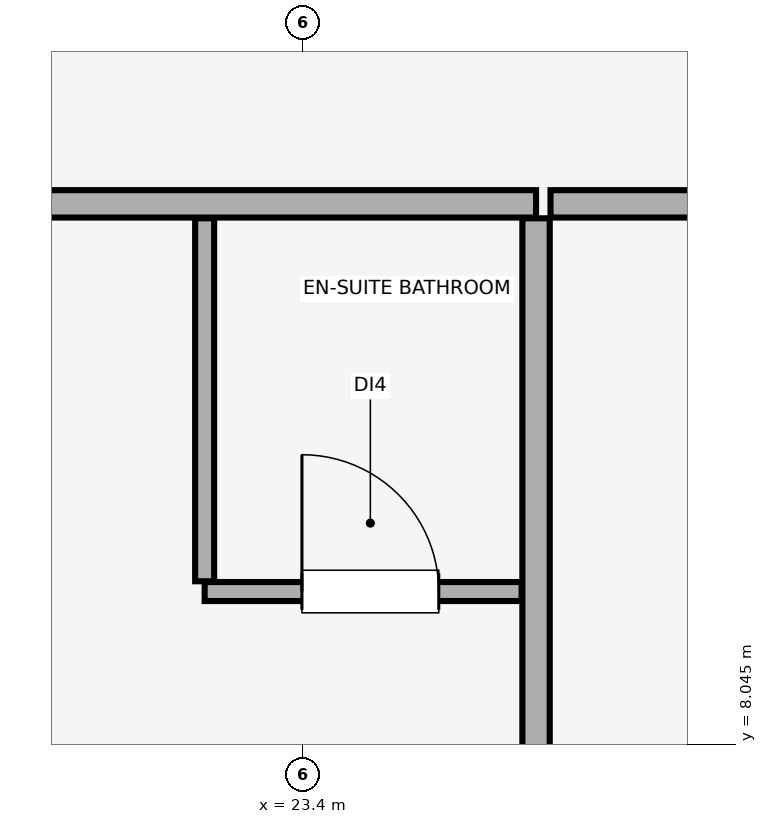
"""IFC4 building model, lengths in metres.
Left out: names, types, materials, properties, quantities, classifications, styles, units other than length and angle.
Written with IfcOpenShell. Run it as: python <this file> out.ifc"""

import sys

from ifc_helpers import new_model, si_unit, direction, frame, frame_2d, origin, place, context, subcontext, project, spatial, rectangle, extrude, element, fill, save


model = new_model("IFC4")
c1 = context("Model", 3, precision=1e-05, world=origin(), true_north=direction((0.0, 1.0)))
c2 = subcontext(c1, "Body", "Model", "MODEL_VIEW")
j1 = project(units=[si_unit("LENGTHUNIT", "METRE"), si_unit("PLANEANGLEUNIT", "RADIAN")], contexts=[c1])
p1 = place(None, origin())
s1 = spatial("IfcSite", under=j1, at=p1, CompositionType="ELEMENT")
p2 = place(p1, origin())
s2 = spatial("IfcBuilding", under=s1, at=p2, CompositionType="ELEMENT")
p3 = place(p2, frame((0.0, 0.0, 50.15)))
s3 = spatial("IfcBuildingStorey", under=s2, at=p3, CompositionType="ELEMENT", Elevation=50.15)
p4 = place(p3, frame((18.199, 11.6, 0.0), z_axis=(0.0, 0.0, 1.0), x_axis=(1.0, 0.0, 0.0)))
e1 = element("IfcWall", 1, at=p4, inside=s3, PredefinedType="PARTITIONING", context=c2, shape_type="SweptSolid", body=[
    extrude(rectangle(XDim=6.732, YDim=0.18, at=frame_2d((3.366, 0.0))), origin(), (0.0, 0.0, 1.0), 3.51),
])
p5 = place(p4, frame((1.279, 0.0, 0.0)))
e2 = element("IfcOpeningElement", 2, at=p5, cuts=e1, PredefinedType="OPENING", context=c2, shape_type="SweptSolid", body=[
    extrude(rectangle(XDim=1.0, YDim=2.15, at=frame_2d((0.5, 1.075))), frame((0.0, 0.1, 0.0), z_axis=(0.0, -1.0, 0.0), x_axis=(1.0, 0.0, 0.0)), (0.0, 0.0, 1.0), 0.2),
])
p6 = place(p3, frame((24.932, 0.15, 0.0), z_axis=(0.0, 0.0, 1.0), x_axis=(0.0, 1.0, 0.0)))
e3 = element("IfcWall", 3, at=p6, inside=s3, PredefinedType="PARTITIONING", context=c2, shape_type="SweptSolid", body=[
    extrude(rectangle(XDim=11.355, YDim=0.18, at=frame_2d((5.677, 0.0))), origin(), (0.0, 0.0, 1.0), 3.51),
])
p7 = place(p3, frame((22.752, 9.05, 0.0), z_axis=(0.0, 0.0, 1.0), x_axis=(1.0, 0.0, 0.0)))
e4 = element("IfcWall", 4, at=p7, inside=s3, PredefinedType="PARTITIONING", context=c2, shape_type="SweptSolid", body=[
    extrude(rectangle(XDim=2.085, YDim=0.125, at=frame_2d((1.042, 0.0))), origin(), (0.0, 0.0, 1.0), 3.51),
])
p8 = place(p7, frame((0.64, 0.0, 0.0)))
e5 = element("IfcOpeningElement", 5, at=p8, cuts=e4, PredefinedType="OPENING", context=c2, shape_type="SweptSolid", body=[
    extrude(rectangle(XDim=0.9, YDim=2.1, at=frame_2d((0.45, 1.05))), frame((0.0, 0.073, 0.0), z_axis=(0.0, -1.0, 0.0), x_axis=(1.0, 0.0, 0.0)), (0.0, 0.0, 1.0), 0.145),
])
p9 = place(p3, frame((22.752, 9.117, 0.0), z_axis=(0.0, 0.0, 1.0), x_axis=(0.0, 1.0, 0.0)))
e6 = element("IfcWall", 6, at=p9, inside=s3, PredefinedType="PARTITIONING", context=c2, shape_type="SweptSolid", body=[
    extrude(rectangle(XDim=2.387, YDim=0.125, at=frame_2d((1.194, 0.0))), origin(), (0.0, 0.0, 1.0), 2.88),
])
p10 = place(p3, frame((25.027, 11.6, 0.0), z_axis=(0.0, 0.0, 1.0), x_axis=(1.0, 0.0, 0.0)))
e7 = element("IfcWall", 7, at=p10, inside=s3, PredefinedType="PARTITIONING", context=c2, shape_type="SweptSolid", body=[
    extrude(rectangle(XDim=6.732, YDim=0.18, at=frame_2d((3.366, 0.0))), origin(), (0.0, 0.0, 1.0), 3.51),
])
p11 = place(p10, frame((1.279, 0.0, 0.0)))
e8 = element("IfcOpeningElement", 8, at=p11, cuts=e7, PredefinedType="OPENING", context=c2, shape_type="SweptSolid", body=[
    extrude(rectangle(XDim=1.0, YDim=2.15, at=frame_2d((0.5, 1.075))), frame((0.0, 0.1, 0.0), z_axis=(0.0, -1.0, 0.0), x_axis=(1.0, 0.0, 0.0)), (0.0, 0.0, 1.0), 0.2),
])
p12 = place(p8, origin())
e9 = element("IfcDoor", 9, at=p12, inside=s3, OperationType="SINGLE_SWING_LEFT", PredefinedType="DOOR", context=c2, shape_type="SweptSolid", body=[
    extrude(rectangle(XDim=0.9, YDim=2.1, at=frame_2d((0.45, 1.05))), frame((0.0, 0.025, 0.0), z_axis=(0.0, -1.0, 0.0), x_axis=(1.0, 0.0, 0.0)), (0.0, 0.0, 1.0), 0.05),
])
fill(e5, e9)
save(model, sys.argv[1])
